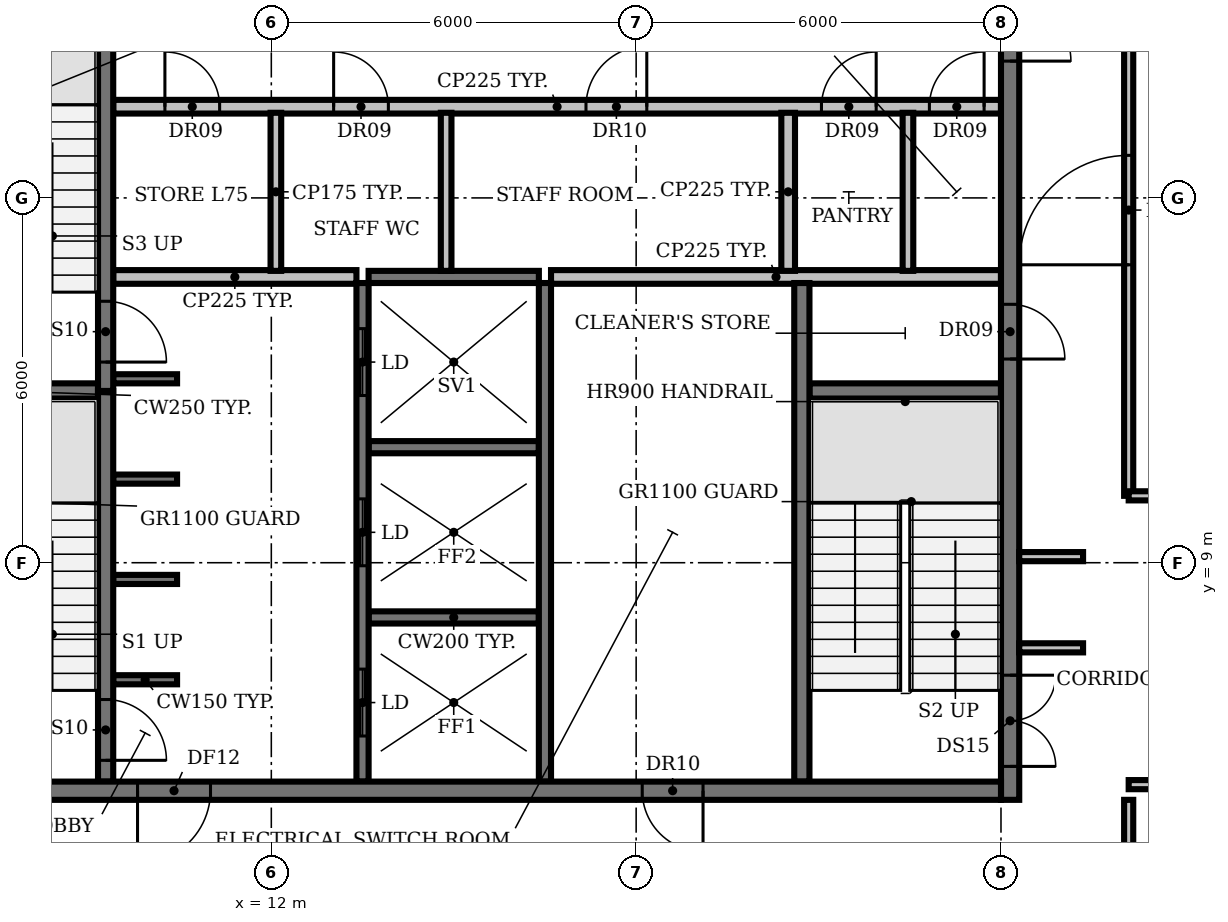
"""IFC4 building model, lengths in metres.
Left out: names, types, materials, properties, quantities, classifications, styles, units other than length and angle.
Written with IfcOpenShell. Run it as: python <this file> out.ifc"""

import sys

from ifc_helpers import new_model, si_unit, direction, frame, frame_2d, origin, place, context, subcontext, project, spatial, rectangle, extrude, element, fill, save


model = new_model("IFC4")
c1 = context("Model", 3, precision=1e-05, world=origin(), true_north=direction((0.0, 1.0)))
c2 = subcontext(c1, "Body", "Model", "MODEL_VIEW")
j1 = project(units=[si_unit("LENGTHUNIT", "METRE"), si_unit("PLANEANGLEUNIT", "RADIAN")], contexts=[c1])
p1 = place(None, origin())
s1 = spatial("IfcSite", under=j1, at=p1, CompositionType="ELEMENT")
p2 = place(p1, origin())
s2 = spatial("IfcBuilding", under=s1, at=p2, CompositionType="ELEMENT")
p3 = place(p2, frame((0.0, 0.0, 335.6)))
s3 = spatial("IfcBuildingStorey", under=s2, at=p3, CompositionType="ELEMENT", Elevation=335.6)
p4 = place(p3, frame((9.4, 7.075, 0.0), z_axis=(0.0, 0.0, 1.0), x_axis=(1.0, 0.0, 0.0)))
e1 = element("IfcWall", 1, at=p4, inside=s3, PredefinedType="SHEAR", context=c2, shape_type="SweptSolid", body=[
    extrude(rectangle(XDim=1.05, YDim=0.15, at=frame_2d((0.525, 0.0))), origin(), (0.0, 0.0, 1.0), 3.9),
])
p5 = place(p3, frame((13.6, 8.1, 0.0), z_axis=(0.0, 0.0, 1.0), x_axis=(1.0, 0.0, 0.0)))
e2 = element("IfcWall", 2, at=p5, inside=s3, PredefinedType="SHEAR", context=c2, shape_type="SweptSolid", body=[
    extrude(rectangle(XDim=2.8, YDim=0.2, at=frame_2d((1.4, 0.0))), origin(), (0.0, 0.0, 1.0), 3.9),
])
for number, where, z_axis, x_axis in (
    (3, (9.4, 8.725, 0.0), (0.0, 0.0, 1.0), (1.0, 0.0, 0.0)),
    (4, (9.4, 10.375, 0.0), (0.0, 0.0, 1.0), (1.0, 0.0, 0.0)),
):
    element("IfcWall", number, at=place(p3, frame(where, z_axis=z_axis, x_axis=x_axis)), inside=s3, PredefinedType="SHEAR", context=c2, shape_type="SweptSolid", body=[
        extrude(rectangle(XDim=1.05, YDim=0.15, at=frame_2d((0.525, 0.0))), origin(), (0.0, 0.0, 1.0), 3.9),
    ])
p6 = place(p3, frame((13.6, 10.9, 0.0), z_axis=(0.0, 0.0, 1.0), x_axis=(1.0, 0.0, 0.0)))
e5 = element("IfcWall", 5, at=p6, inside=s3, PredefinedType="SHEAR", context=c2, shape_type="SweptSolid", body=[
    extrude(rectangle(XDim=2.8, YDim=0.2, at=frame_2d((1.4, 0.0))), origin(), (0.0, 0.0, 1.0), 3.9),
])
for number, where, z_axis, x_axis in (
    (6, (6.0, 11.825, 0.0), (0.0, 0.0, 1.0), (1.0, 0.0, 0.0)),
    (7, (20.85, 11.825, 0.0), (0.0, 0.0, 1.0), (1.0, 0.0, 0.0)),
):
    element("IfcWall", number, at=place(p3, frame(where, z_axis=z_axis, x_axis=x_axis)), inside=s3, PredefinedType="SHEAR", context=c2, shape_type="SweptSolid", body=[
        extrude(rectangle(XDim=3.15, YDim=0.25, at=frame_2d((1.575, 0.0))), origin(), (0.0, 0.0, 1.0), 3.9),
    ])
p7 = place(p3, frame((9.4, 12.025, 0.0), z_axis=(0.0, 0.0, 1.0), x_axis=(1.0, 0.0, 0.0)))
e8 = element("IfcWall", 8, at=p7, inside=s3, PredefinedType="SHEAR", context=c2, shape_type="SweptSolid", body=[
    extrude(rectangle(XDim=1.05, YDim=0.15, at=frame_2d((0.525, 0.0))), origin(), (0.0, 0.0, 1.0), 3.9),
])
p8 = place(p3, frame((9.4, 13.7, 0.0), z_axis=(0.0, 0.0, 1.0), x_axis=(1.0, 0.0, 0.0)))
e9 = element("IfcWall", 9, at=p8, inside=s3, PredefinedType="PARTITIONING", context=c2, shape_type="SweptSolid", body=[
    extrude(rectangle(XDim=4.0, YDim=0.225, at=frame_2d((2.0, 0.0))), origin(), (0.0, 0.0, 1.0), 3.9),
])
p9 = place(p3, frame((13.6, 13.7, 0.0), z_axis=(0.0, 0.0, 1.0), x_axis=(1.0, 0.0, 0.0)))
e10 = element("IfcWall", 10, at=p9, inside=s3, PredefinedType="SHEAR", context=c2, shape_type="SweptSolid", body=[
    extrude(rectangle(XDim=2.8, YDim=0.2, at=frame_2d((1.4, 0.0))), origin(), (0.0, 0.0, 1.0), 3.9),
])
p10 = place(p3, frame((16.6, 13.7, 0.0), z_axis=(0.0, 0.0, 1.0), x_axis=(1.0, 0.0, 0.0)))
e11 = element("IfcWall", 11, at=p10, inside=s3, PredefinedType="PARTITIONING", context=c2, shape_type="SweptSolid", body=[
    extrude(rectangle(XDim=7.4, YDim=0.225, at=frame_2d((3.7, 0.0))), origin(), (0.0, 0.0, 1.0), 3.9),
])
p11 = place(p3, frame((9.4, 16.5, 0.0), z_axis=(0.0, 0.0, 1.0), x_axis=(1.0, 0.0, 0.0)))
e12 = element("IfcWall", 12, at=p11, inside=s3, PredefinedType="PARTITIONING", context=c2, shape_type="SweptSolid", body=[
    extrude(rectangle(XDim=14.6, YDim=0.225, at=frame_2d((7.3, 0.0))), origin(), (0.0, 0.0, 1.0), 3.9),
])
p12 = place(p11, frame((0.85, 0.0, 0.0)))
e13 = element("IfcOpeningElement", 13, at=p12, cuts=e12, PredefinedType="OPENING", context=c2, shape_type="SweptSolid", body=[
    extrude(rectangle(XDim=0.9, YDim=2.1, at=frame_2d((0.45, 1.05))), frame((0.0, 0.123, 0.0), z_axis=(0.0, -1.0, 0.0), x_axis=(1.0, 0.0, 0.0)), (0.0, 0.0, 1.0), 0.245),
])
p13 = place(p11, frame((3.625, 0.0, 0.0)))
e14 = element("IfcOpeningElement", 14, at=p13, cuts=e12, PredefinedType="OPENING", context=c2, shape_type="SweptSolid", body=[
    extrude(rectangle(XDim=0.9, YDim=2.1, at=frame_2d((0.45, 1.05))), frame((0.0, 0.123, 0.0), z_axis=(0.0, -1.0, 0.0), x_axis=(1.0, 0.0, 0.0)), (0.0, 0.0, 1.0), 0.245),
])
p14 = place(p11, frame((7.775, 0.0, 0.0)))
e15 = element("IfcOpeningElement", 15, at=p14, cuts=e12, PredefinedType="OPENING", context=c2, shape_type="SweptSolid", body=[
    extrude(rectangle(XDim=1.0, YDim=2.1, at=frame_2d((0.5, 1.05))), frame((0.0, 0.123, 0.0), z_axis=(0.0, -1.0, 0.0), x_axis=(1.0, 0.0, 0.0)), (0.0, 0.0, 1.0), 0.245),
])
p15 = place(p11, frame((11.647, 0.0, 0.0)))
e16 = element("IfcOpeningElement", 16, at=p15, cuts=e12, PredefinedType="OPENING", context=c2, shape_type="SweptSolid", body=[
    extrude(rectangle(XDim=0.9, YDim=2.1, at=frame_2d((0.45, 1.05))), frame((0.0, 0.123, 0.0), z_axis=(0.0, -1.0, 0.0), x_axis=(1.0, 0.0, 0.0)), (0.0, 0.0, 1.0), 0.245),
])
p16 = place(p11, frame((13.423, 0.0, 0.0)))
e17 = element("IfcOpeningElement", 17, at=p16, cuts=e12, PredefinedType="OPENING", context=c2, shape_type="SweptSolid", body=[
    extrude(rectangle(XDim=0.9, YDim=2.1, at=frame_2d((0.45, 1.05))), frame((0.0, 0.123, 0.0), z_axis=(0.0, -1.0, 0.0), x_axis=(1.0, 0.0, 0.0)), (0.0, 0.0, 1.0), 0.245),
])
p17 = place(p3, frame((9.275, 11.825, 0.0), z_axis=(0.0, 0.0, 1.0), x_axis=(0.0, -1.0, 0.0)))
e18 = element("IfcWall", 18, at=p17, inside=s3, PredefinedType="SHEAR", context=c2, shape_type="SweptSolid", body=[
    extrude(rectangle(XDim=6.425, YDim=0.25, at=frame_2d((3.212, 0.0))), origin(), (0.0, 0.0, 1.0), 3.9),
])
p18 = place(p17, frame((5.075, 0.0, 0.0)))
e19 = element("IfcOpeningElement", 19, at=p18, cuts=e18, PredefinedType="OPENING", context=c2, shape_type="SweptSolid", body=[
    extrude(rectangle(XDim=1.0, YDim=2.1, at=frame_2d((0.5, 1.05))), frame((0.0, 0.135, 0.0), z_axis=(0.0, -1.0, 0.0), x_axis=(1.0, 0.0, 0.0)), (0.0, 0.0, 1.0), 0.27),
])
p19 = place(p3, frame((9.275, 18.375, 0.0), z_axis=(0.0, 0.0, 1.0), x_axis=(0.0, -1.0, 0.0)))
e20 = element("IfcWall", 20, at=p19, inside=s3, PredefinedType="SHEAR", context=c2, shape_type="SweptSolid", body=[
    extrude(rectangle(XDim=6.55, YDim=0.25, at=frame_2d((3.275, 0.0))), origin(), (0.0, 0.0, 1.0), 3.9),
])
p20 = place(p19, frame((5.075, 0.0, 0.0)))
e21 = element("IfcOpeningElement", 21, at=p20, cuts=e20, PredefinedType="OPENING", context=c2, shape_type="SweptSolid", body=[
    extrude(rectangle(XDim=1.0, YDim=2.1, at=frame_2d((0.5, 1.05))), frame((0.0, 0.135, 0.0), z_axis=(0.0, -1.0, 0.0), x_axis=(1.0, 0.0, 0.0)), (0.0, 0.0, 1.0), 0.27),
])
p21 = place(p3, frame((12.075, 13.8, 0.0), z_axis=(0.0, 0.0, 1.0), x_axis=(0.0, 1.0, 0.0)))
e22 = element("IfcWall", 22, at=p21, inside=s3, PredefinedType="PARTITIONING", context=c2, shape_type="SweptSolid", body=[
    extrude(rectangle(XDim=2.6, YDim=0.175, at=frame_2d((1.3, 0.0))), origin(), (0.0, 0.0, 1.0), 3.9),
])
p22 = place(p3, frame((13.5, 5.4, 0.0), z_axis=(0.0, 0.0, 1.0), x_axis=(0.0, 1.0, 0.0)))
e23 = element("IfcWall", 23, at=p22, inside=s3, PredefinedType="SHEAR", context=c2, shape_type="SweptSolid", body=[
    extrude(rectangle(XDim=8.2, YDim=0.2, at=frame_2d((4.1, 0.0))), origin(), (0.0, 0.0, 1.0), 3.9),
])
p23 = place(p22, frame((0.75, 0.0, 0.0)))
e24 = element("IfcOpeningElement", 24, at=p23, cuts=e23, PredefinedType="OPENING", context=c2, shape_type="SweptSolid", body=[
    extrude(rectangle(XDim=1.1, YDim=2.1, at=frame_2d((0.55, 1.05))), frame((0.0, 0.11, 0.0), z_axis=(0.0, -1.0, 0.0), x_axis=(1.0, 0.0, 0.0)), (0.0, 0.0, 1.0), 0.22),
])
p24 = place(p22, frame((3.55, 0.0, 0.0)))
e25 = element("IfcOpeningElement", 25, at=p24, cuts=e23, PredefinedType="OPENING", context=c2, shape_type="SweptSolid", body=[
    extrude(rectangle(XDim=1.1, YDim=2.1, at=frame_2d((0.55, 1.05))), frame((0.0, 0.11, 0.0), z_axis=(0.0, -1.0, 0.0), x_axis=(1.0, 0.0, 0.0)), (0.0, 0.0, 1.0), 0.22),
])
p25 = place(p22, frame((6.35, 0.0, 0.0)))
e26 = element("IfcOpeningElement", 26, at=p25, cuts=e23, PredefinedType="OPENING", context=c2, shape_type="SweptSolid", body=[
    extrude(rectangle(XDim=1.1, YDim=2.1, at=frame_2d((0.55, 1.05))), frame((0.0, 0.11, 0.0), z_axis=(0.0, -1.0, 0.0), x_axis=(1.0, 0.0, 0.0)), (0.0, 0.0, 1.0), 0.22),
])
p26 = place(p3, frame((14.875, 13.8, 0.0), z_axis=(0.0, 0.0, 1.0), x_axis=(0.0, 1.0, 0.0)))
e27 = element("IfcWall", 27, at=p26, inside=s3, PredefinedType="PARTITIONING", context=c2, shape_type="SweptSolid", body=[
    extrude(rectangle(XDim=2.6, YDim=0.175, at=frame_2d((1.3, 0.0))), origin(), (0.0, 0.0, 1.0), 3.9),
])
p27 = place(p3, frame((16.5, 5.4, 0.0), z_axis=(0.0, 0.0, 1.0), x_axis=(0.0, 1.0, 0.0)))
e28 = element("IfcWall", 28, at=p27, inside=s3, PredefinedType="SHEAR", context=c2, shape_type="SweptSolid", body=[
    extrude(rectangle(XDim=8.2, YDim=0.2, at=frame_2d((4.1, 0.0))), origin(), (0.0, 0.0, 1.0), 3.9),
])
p28 = place(p3, frame((20.5, 13.8, 0.0), z_axis=(0.0, 0.0, 1.0), x_axis=(0.0, 1.0, 0.0)))
e29 = element("IfcWall", 29, at=p28, inside=s3, PredefinedType="PARTITIONING", context=c2, shape_type="SweptSolid", body=[
    extrude(rectangle(XDim=2.6, YDim=0.225, at=frame_2d((1.3, 0.0))), origin(), (0.0, 0.0, 1.0), 3.9),
])
p29 = place(p3, frame((20.725, 5.4, 0.0), z_axis=(0.0, 0.0, 1.0), x_axis=(0.0, 1.0, 0.0)))
e30 = element("IfcWall", 30, at=p29, inside=s3, PredefinedType="SHEAR", context=c2, shape_type="SweptSolid", body=[
    extrude(rectangle(XDim=8.2, YDim=0.25, at=frame_2d((4.1, 0.0))), origin(), (0.0, 0.0, 1.0), 3.9),
])
p30 = place(p3, frame((22.47, 13.8, 0.0), z_axis=(0.0, 0.0, 1.0), x_axis=(0.0, 1.0, 0.0)))
e31 = element("IfcWall", 31, at=p30, inside=s3, PredefinedType="PARTITIONING", context=c2, shape_type="SweptSolid", body=[
    extrude(rectangle(XDim=2.6, YDim=0.175, at=frame_2d((1.3, 0.0))), origin(), (0.0, 0.0, 1.0), 3.9),
])
p31 = place(p3, frame((24.15, 25.705, 0.0), z_axis=(0.0, 0.0, 1.0), x_axis=(0.0, -1.0, 0.0)))
e32 = element("IfcWall", 32, at=p31, inside=s3, PredefinedType="SHEAR", context=c2, shape_type="SweptSolid", body=[
    extrude(rectangle(XDim=20.605, YDim=0.3, at=frame_2d((10.302, 0.0))), origin(), (0.0, 0.0, 1.0), 3.9),
])
p32 = place(p31, frame((18.555, 0.0, 0.0)))
e33 = element("IfcOpeningElement", 33, at=p32, cuts=e32, PredefinedType="OPENING", context=c2, shape_type="SweptSolid", body=[
    extrude(rectangle(XDim=1.5, YDim=2.1, at=frame_2d((0.75, 1.05))), frame((0.0, 0.16, 0.0), z_axis=(0.0, -1.0, 0.0), x_axis=(1.0, 0.0, 0.0)), (0.0, 0.0, 1.0), 0.32),
])
p33 = place(p31, frame((12.455, 0.0, 0.0)))
e34 = element("IfcOpeningElement", 34, at=p33, cuts=e32, PredefinedType="OPENING", context=c2, shape_type="SweptSolid", body=[
    extrude(rectangle(XDim=0.9, YDim=2.1, at=frame_2d((0.45, 1.05))), frame((0.0, 0.16, 0.0), z_axis=(0.0, -1.0, 0.0), x_axis=(1.0, 0.0, 0.0)), (0.0, 0.0, 1.0), 0.32),
])
p34 = place(p31, frame((6.455, 0.0, 0.0)))
e35 = element("IfcOpeningElement", 35, at=p34, cuts=e32, PredefinedType="OPENING", context=c2, shape_type="SweptSolid", body=[
    extrude(rectangle(XDim=2.0, YDim=2.1, at=frame_2d((1.0, 1.05))), frame((0.0, 0.16, 0.0), z_axis=(0.0, -1.0, 0.0), x_axis=(1.0, 0.0, 0.0)), (0.0, 0.0, 1.0), 0.32),
])
p35 = place(p3, frame((24.0, 5.25, 0.0), z_axis=(0.0, 0.0, 1.0), x_axis=(-1.0, 0.0, 0.0)))
e36 = element("IfcWall", 36, at=p35, inside=s3, PredefinedType="SHEAR", context=c2, shape_type="SweptSolid", body=[
    extrude(rectangle(XDim=18.0, YDim=0.3, at=frame_2d((9.0, 0.0))), origin(), (0.0, 0.0, 1.0), 3.9),
])
p36 = place(p35, frame((13.0, 0.0, 0.0)))
e37 = element("IfcOpeningElement", 37, at=p36, cuts=e36, PredefinedType="OPENING", context=c2, shape_type="SweptSolid", body=[
    extrude(rectangle(XDim=1.2, YDim=2.1, at=frame_2d((0.6, 1.05))), frame((0.0, 0.16, 0.0), z_axis=(0.0, -1.0, 0.0), x_axis=(1.0, 0.0, 0.0)), (0.0, 0.0, 1.0), 0.32),
])
p37 = place(p35, frame((4.9, 0.0, 0.0)))
e38 = element("IfcOpeningElement", 38, at=p37, cuts=e36, PredefinedType="OPENING", context=c2, shape_type="SweptSolid", body=[
    extrude(rectangle(XDim=1.0, YDim=2.1, at=frame_2d((0.5, 1.05))), frame((0.0, 0.16, 0.0), z_axis=(0.0, -1.0, 0.0), x_axis=(1.0, 0.0, 0.0)), (0.0, 0.0, 1.0), 0.32),
])
for number, where, z_axis, x_axis in (
    (39, (24.3, 7.6, 0.0), (0.0, 0.0, 1.0), (1.0, 0.0, 0.0)),
    (40, (24.3, 9.1, 0.0), (0.0, 0.0, 1.0), (1.0, 0.0, 0.0)),
):
    element("IfcWall", number, at=place(p3, frame(where, z_axis=z_axis, x_axis=x_axis)), inside=s3, PredefinedType="PARTITIONING", context=c2, shape_type="SweptSolid", body=[
        extrude(rectangle(XDim=1.05, YDim=0.15, at=frame_2d((0.525, 0.0))), origin(), (0.0, 0.0, 1.0), 2.95),
    ])
p38 = place(p3, frame((26.1, 2.1, 0.0), z_axis=(0.0, 0.0, 1.0), x_axis=(0.0, 1.0, 0.0)))
e41 = element("IfcWall", 41, at=p38, inside=s3, PredefinedType="PARTITIONING", context=c2, shape_type="SweptSolid", body=[
    extrude(rectangle(XDim=3.0, YDim=0.15, at=frame_2d((1.5, 0.0))), origin(), (0.0, 0.0, 1.0), 2.95),
])
p39 = place(p3, frame((26.1, 10.1, 0.0), z_axis=(0.0, 0.0, 1.0), x_axis=(0.0, 1.0, 0.0)))
e42 = element("IfcWall", 42, at=p39, inside=s3, PredefinedType="PARTITIONING", context=c2, shape_type="SweptSolid", body=[
    extrude(rectangle(XDim=9.18, YDim=0.15, at=frame_2d((4.59, 0.0))), origin(), (0.0, 0.0, 1.0), 2.95),
])
p40 = place(p39, frame((3.8, 0.0, 0.0)))
e43 = element("IfcOpeningElement", 43, at=p40, cuts=e42, PredefinedType="OPENING", context=c2, shape_type="SweptSolid", body=[
    extrude(rectangle(XDim=1.8, YDim=2.1, at=frame_2d((0.9, 1.05))), frame((0.0, 0.085, 0.0), z_axis=(0.0, -1.0, 0.0), x_axis=(1.0, 0.0, 0.0)), (0.0, 0.0, 1.0), 0.17),
])
p41 = place(p3, frame((26.1, 10.1, 0.0), z_axis=(0.0, 0.0, 1.0), x_axis=(1.0, 0.0, 0.0)))
e44 = element("IfcWall", 44, at=p41, inside=s3, PredefinedType="PARTITIONING", context=c2, shape_type="SweptSolid", body=[
    extrude(rectangle(XDim=1.11, YDim=0.15, at=frame_2d((0.555, 0.0))), origin(), (0.0, 0.0, 1.0), 2.95),
])
p42 = place(p3, frame((30.98, 5.35, 0.0), z_axis=(0.0, 0.0, 1.0), x_axis=(-1.0, 0.0, 0.0)))
e45 = element("IfcWall", 45, at=p42, inside=s3, PredefinedType="PARTITIONING", context=c2, shape_type="SweptSolid", body=[
    extrude(rectangle(XDim=4.88, YDim=0.15, at=frame_2d((2.44, 0.0))), origin(), (0.0, 0.0, 1.0), 2.95),
])
p43 = place(p42, frame((2.18, 0.0, 0.0)))
e46 = element("IfcOpeningElement", 46, at=p43, cuts=e45, PredefinedType="OPENING", context=c2, shape_type="SweptSolid", body=[
    extrude(rectangle(XDim=1.0, YDim=2.1, at=frame_2d((0.5, 1.05))), frame((0.0, 0.085, 0.0), z_axis=(0.0, -1.0, 0.0), x_axis=(1.0, 0.0, 0.0)), (0.0, 0.0, 1.0), 0.17),
])
p44 = place(p12, origin())
e47 = element("IfcDoor", 47, at=p44, inside=s3, OperationType="SINGLE_SWING_LEFT", PredefinedType="DOOR", context=c2, shape_type="SweptSolid", body=[
    extrude(rectangle(XDim=0.9, YDim=2.1, at=frame_2d((0.45, 1.05))), frame((0.0, 0.025, 0.0), z_axis=(0.0, -1.0, 0.0), x_axis=(1.0, 0.0, 0.0)), (0.0, 0.0, 1.0), 0.05),
])
fill(e13, e47)
p45 = place(p13, origin())
e48 = element("IfcDoor", 48, at=p45, inside=s3, OperationType="SINGLE_SWING_LEFT", PredefinedType="DOOR", context=c2, shape_type="SweptSolid", body=[
    extrude(rectangle(XDim=0.9, YDim=2.1, at=frame_2d((0.45, 1.05))), frame((0.0, 0.025, 0.0), z_axis=(0.0, -1.0, 0.0), x_axis=(1.0, 0.0, 0.0)), (0.0, 0.0, 1.0), 0.05),
])
fill(e14, e48)
p46 = place(p14, origin())
e49 = element("IfcDoor", 49, at=p46, inside=s3, OperationType="SINGLE_SWING_RIGHT", PredefinedType="DOOR", context=c2, shape_type="SweptSolid", body=[
    extrude(rectangle(XDim=1.0, YDim=2.1, at=frame_2d((0.5, 1.05))), frame((0.0, 0.025, 0.0), z_axis=(0.0, -1.0, 0.0), x_axis=(1.0, 0.0, 0.0)), (0.0, 0.0, 1.0), 0.05),
])
fill(e15, e49)
p47 = place(p15, origin())
e50 = element("IfcDoor", 50, at=p47, inside=s3, OperationType="SINGLE_SWING_RIGHT", PredefinedType="DOOR", context=c2, shape_type="SweptSolid", body=[
    extrude(rectangle(XDim=0.9, YDim=2.1, at=frame_2d((0.45, 1.05))), frame((0.0, 0.025, 0.0), z_axis=(0.0, -1.0, 0.0), x_axis=(1.0, 0.0, 0.0)), (0.0, 0.0, 1.0), 0.05),
])
fill(e16, e50)
p48 = place(p16, origin())
e51 = element("IfcDoor", 51, at=p48, inside=s3, OperationType="SINGLE_SWING_RIGHT", PredefinedType="DOOR", context=c2, shape_type="SweptSolid", body=[
    extrude(rectangle(XDim=0.9, YDim=2.1, at=frame_2d((0.45, 1.05))), frame((0.0, 0.025, 0.0), z_axis=(0.0, -1.0, 0.0), x_axis=(1.0, 0.0, 0.0)), (0.0, 0.0, 1.0), 0.05),
])
fill(e17, e51)
p49 = place(p18, origin())
e52 = element("IfcDoor", 52, at=p49, inside=s3, OperationType="SINGLE_SWING_RIGHT", PredefinedType="DOOR", context=c2, shape_type="SweptSolid", body=[
    extrude(rectangle(XDim=1.0, YDim=2.1, at=frame_2d((0.5, 1.05))), frame((0.0, 0.025, 0.0), z_axis=(0.0, -1.0, 0.0), x_axis=(1.0, 0.0, 0.0)), (0.0, 0.0, 1.0), 0.05),
])
fill(e19, e52)
p50 = place(p20, origin())
e53 = element("IfcDoor", 53, at=p50, inside=s3, OperationType="SINGLE_SWING_RIGHT", PredefinedType="DOOR", context=c2, shape_type="SweptSolid", body=[
    extrude(rectangle(XDim=1.0, YDim=2.1, at=frame_2d((0.5, 1.05))), frame((0.0, 0.025, 0.0), z_axis=(0.0, -1.0, 0.0), x_axis=(1.0, 0.0, 0.0)), (0.0, 0.0, 1.0), 0.05),
])
fill(e21, e53)
p51 = place(p23, origin())
e54 = element("IfcDoor", 54, at=p51, inside=s3, OperationType="DOUBLE_DOOR_SLIDING", PredefinedType="DOOR", context=c2, shape_type="SweptSolid", body=[
    extrude(rectangle(XDim=1.1, YDim=2.1, at=frame_2d((0.55, 1.05))), frame((0.0, 0.025, 0.0), z_axis=(0.0, -1.0, 0.0), x_axis=(1.0, 0.0, 0.0)), (0.0, 0.0, 1.0), 0.05),
])
fill(e24, e54)
p52 = place(p24, origin())
e55 = element("IfcDoor", 55, at=p52, inside=s3, OperationType="DOUBLE_DOOR_SLIDING", PredefinedType="DOOR", context=c2, shape_type="SweptSolid", body=[
    extrude(rectangle(XDim=1.1, YDim=2.1, at=frame_2d((0.55, 1.05))), frame((0.0, 0.025, 0.0), z_axis=(0.0, -1.0, 0.0), x_axis=(1.0, 0.0, 0.0)), (0.0, 0.0, 1.0), 0.05),
])
fill(e25, e55)
p53 = place(p25, origin())
e56 = element("IfcDoor", 56, at=p53, inside=s3, OperationType="DOUBLE_DOOR_SLIDING", PredefinedType="DOOR", context=c2, shape_type="SweptSolid", body=[
    extrude(rectangle(XDim=1.1, YDim=2.1, at=frame_2d((0.55, 1.05))), frame((0.0, 0.025, 0.0), z_axis=(0.0, -1.0, 0.0), x_axis=(1.0, 0.0, 0.0)), (0.0, 0.0, 1.0), 0.05),
])
fill(e26, e56)
p54 = place(p32, origin())
e57 = element("IfcDoor", 57, at=p54, inside=s3, OperationType="DOUBLE_DOOR_SINGLE_SWING", PredefinedType="DOOR", context=c2, shape_type="SweptSolid", body=[
    extrude(rectangle(XDim=1.5, YDim=2.1, at=frame_2d((0.75, 1.05))), frame((0.0, 0.025, 0.0), z_axis=(0.0, -1.0, 0.0), x_axis=(1.0, 0.0, 0.0)), (0.0, 0.0, 1.0), 0.05),
])
fill(e33, e57)
p55 = place(p33, origin())
e58 = element("IfcDoor", 58, at=p55, inside=s3, OperationType="SINGLE_SWING_RIGHT", PredefinedType="DOOR", context=c2, shape_type="SweptSolid", body=[
    extrude(rectangle(XDim=0.9, YDim=2.1, at=frame_2d((0.45, 1.05))), frame((0.0, 0.025, 0.0), z_axis=(0.0, -1.0, 0.0), x_axis=(1.0, 0.0, 0.0)), (0.0, 0.0, 1.0), 0.05),
])
fill(e34, e58)
p56 = place(p34, origin())
e59 = element("IfcDoor", 59, at=p56, inside=s3, OperationType="DOUBLE_DOOR_SINGLE_SWING", PredefinedType="DOOR", context=c2, shape_type="SweptSolid", body=[
    extrude(rectangle(XDim=2.0, YDim=2.1, at=frame_2d((1.0, 1.05))), frame((0.0, 0.025, 0.0), z_axis=(0.0, -1.0, 0.0), x_axis=(1.0, 0.0, 0.0)), (0.0, 0.0, 1.0), 0.05),
])
fill(e35, e59)
p57 = place(p36, origin())
e60 = element("IfcDoor", 60, at=p57, inside=s3, OperationType="SINGLE_SWING_RIGHT", PredefinedType="DOOR", context=c2, shape_type="SweptSolid", body=[
    extrude(rectangle(XDim=1.2, YDim=2.1, at=frame_2d((0.6, 1.05))), frame((0.0, 0.025, 0.0), z_axis=(0.0, -1.0, 0.0), x_axis=(1.0, 0.0, 0.0)), (0.0, 0.0, 1.0), 0.05),
])
fill(e37, e60)
p58 = place(p37, origin())
e61 = element("IfcDoor", 61, at=p58, inside=s3, OperationType="SINGLE_SWING_LEFT", PredefinedType="DOOR", context=c2, shape_type="SweptSolid", body=[
    extrude(rectangle(XDim=1.0, YDim=2.1, at=frame_2d((0.5, 1.05))), frame((0.0, 0.025, 0.0), z_axis=(0.0, -1.0, 0.0), x_axis=(1.0, 0.0, 0.0)), (0.0, 0.0, 1.0), 0.05),
])
fill(e38, e61)
p59 = place(p40, origin())
e62 = element("IfcDoor", 62, at=p59, inside=s3, OperationType="SINGLE_SWING_LEFT", PredefinedType="DOOR", context=c2, shape_type="SweptSolid", body=[
    extrude(rectangle(XDim=1.8, YDim=2.1, at=frame_2d((0.9, 1.05))), frame((0.0, 0.025, 0.0), z_axis=(0.0, -1.0, 0.0), x_axis=(1.0, 0.0, 0.0)), (0.0, 0.0, 1.0), 0.05),
])
fill(e43, e62)
save(model, sys.argv[1])
